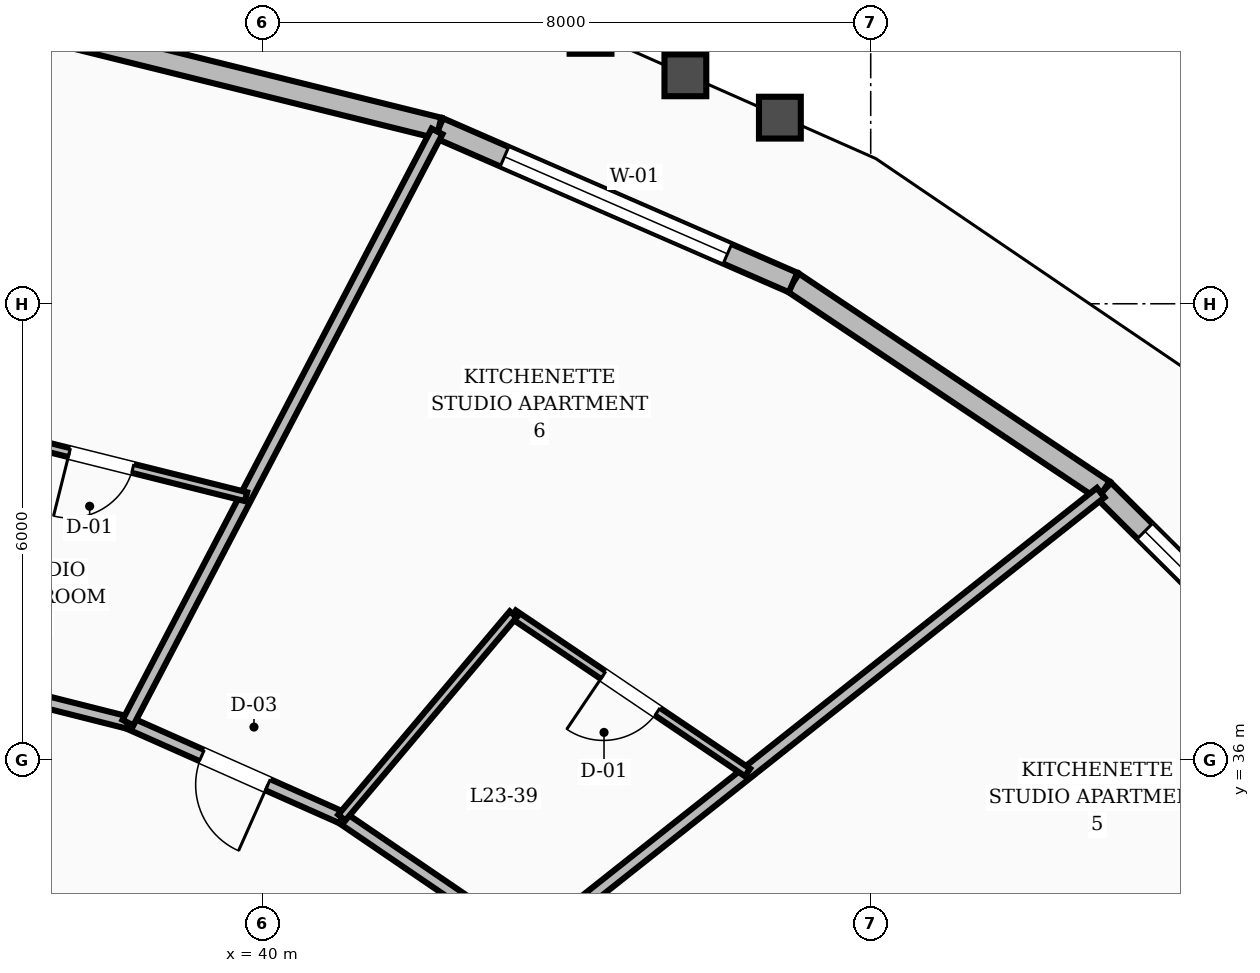
"""IFC4 building model, lengths in metres.
Left out: names, types, materials, properties, quantities, classifications, styles, units other than length and angle.
Written with IfcOpenShell. Run it as: python <this file> out.ifc"""

import sys

from ifc_helpers import new_model, si_unit, direction, frame, frame_2d, origin, place, context, subcontext, project, spatial, rectangle, extrude, element, fill, save


model = new_model("IFC4")
c1 = context("Model", 3, precision=1e-05, world=origin(), true_north=direction((0.0, 1.0)))
c2 = subcontext(c1, "Body", "Model", "MODEL_VIEW")
j1 = project(units=[si_unit("LENGTHUNIT", "METRE"), si_unit("PLANEANGLEUNIT", "RADIAN")], contexts=[c1])
p1 = place(None, origin())
s1 = spatial("IfcSite", under=j1, at=p1, CompositionType="ELEMENT")
p2 = place(p1, origin())
s2 = spatial("IfcBuilding", under=s1, at=p2, CompositionType="ELEMENT")
p3 = place(p2, frame((0.0, 0.0, 91.6)))
s3 = spatial("IfcBuildingStorey", under=s2, at=p3, CompositionType="ELEMENT", Elevation=91.6)
p4 = place(p3, frame((54.418, 36.214, 0.0), z_axis=(0.0, 0.0, 1.0), x_axis=(-0.709375776042, 0.704830482006, 0.0)))
e1 = element("IfcWall", 1, at=p4, inside=s3, PredefinedType="STANDARD", context=c2, shape_type="SweptSolid", body=[
    extrude(rectangle(XDim=4.727, YDim=0.28, at=frame_2d((2.363, 0.0))), origin(), (0.0, 0.0, 1.0), 2.71),
])
p5 = place(p4, frame((0.763, 0.0, 0.8)))
e2 = element("IfcOpeningElement", 2, at=p5, cuts=e1, PredefinedType="OPENING", context=c2, shape_type="SweptSolid", body=[
    extrude(rectangle(XDim=3.2, YDim=1.65, at=frame_2d((1.6, 0.825))), frame((0.0, 0.15, 0.0), z_axis=(0.0, -1.0, 0.0), x_axis=(1.0, 0.0, 0.0)), (0.0, 0.0, 1.0), 0.3),
])
p6 = place(p3, frame((51.065, 39.546, 0.0), z_axis=(0.0, 0.0, 1.0), x_axis=(-0.831078719633, 0.556154800189, 0.0)))
e3 = element("IfcWall", 3, at=p6, inside=s3, PredefinedType="STANDARD", context=c2, shape_type="SweptSolid", body=[
    extrude(rectangle(XDim=4.916, YDim=0.28, at=frame_2d((2.458, 0.0))), origin(), (0.0, 0.0, 1.0), 2.71),
])
p7 = place(p3, frame((46.979, 42.28, 0.0), z_axis=(0.0, 0.0, 1.0), x_axis=(-0.916706336202, 0.399561626244, 0.0)))
e4 = element("IfcWall", 4, at=p7, inside=s3, PredefinedType="STANDARD", context=c2, shape_type="SweptSolid", body=[
    extrude(rectangle(XDim=5.085, YDim=0.28, at=frame_2d((2.542, 0.0))), origin(), (0.0, 0.0, 1.0), 2.71),
])
p8 = place(p7, frame((0.942, 0.0, 0.8)))
e5 = element("IfcOpeningElement", 5, at=p8, cuts=e4, PredefinedType="OPENING", context=c2, shape_type="SweptSolid", body=[
    extrude(rectangle(XDim=3.2, YDim=1.65, at=frame_2d((1.6, 0.825))), frame((0.0, 0.15, 0.0), z_axis=(0.0, -1.0, 0.0), x_axis=(1.0, 0.0, 0.0)), (0.0, 0.0, 1.0), 0.3),
])
p9 = place(p3, frame((42.318, 44.312, 0.0), z_axis=(0.0, 0.0, 1.0), x_axis=(-0.970745887498, 0.240109187466, 0.0)))
e6 = element("IfcWall", 6, at=p9, inside=s3, PredefinedType="STANDARD", context=c2, shape_type="SweptSolid", body=[
    extrude(rectangle(XDim=5.21, YDim=0.28, at=frame_2d((2.605, 0.0))), origin(), (0.0, 0.0, 1.0), 2.71),
])
p10 = place(p3, frame((43.508, 33.559, 0.0), z_axis=(0.0, 0.0, 1.0), x_axis=(-0.826293096206, 0.56324037423, 0.0)))
e7 = element("IfcWall", 7, at=p10, inside=s3, PredefinedType="SOLIDWALL", context=c2, shape_type="SweptSolid", body=[
    extrude(rectangle(XDim=2.985, YDim=0.16, at=frame_2d((1.492, 0.0))), origin(), (0.0, 0.0, 1.0), 2.71),
])
p11 = place(p3, frame((41.041, 35.24, 0.0), z_axis=(0.0, 0.0, 1.0), x_axis=(-0.913952123493, 0.405822024984, 0.0)))
e8 = element("IfcWall", 8, at=p11, inside=s3, PredefinedType="SOLIDWALL", context=c2, shape_type="SweptSolid", body=[
    extrude(rectangle(XDim=3.078, YDim=0.16, at=frame_2d((1.539, 0.0))), origin(), (0.0, 0.0, 1.0), 2.71),
])
p12 = place(p11, frame((1.064, 0.0, 0.0)))
e9 = element("IfcOpeningElement", 9, at=p12, cuts=e8, PredefinedType="OPENING", context=c2, shape_type="SweptSolid", body=[
    extrude(rectangle(XDim=0.95, YDim=2.1, at=frame_2d((0.475, 1.05))), frame((0.0, 0.09, 0.0), z_axis=(0.0, -1.0, 0.0), x_axis=(1.0, 0.0, 0.0)), (0.0, 0.0, 1.0), 0.18),
])
p13 = place(p3, frame((38.228, 36.489, 0.0), z_axis=(0.0, 0.0, 1.0), x_axis=(-0.969689238064, 0.244341526521, 0.0)))
e10 = element("IfcWall", 10, at=p13, inside=s3, PredefinedType="SOLIDWALL", context=c2, shape_type="SweptSolid", body=[
    extrude(rectangle(XDim=3.148, YDim=0.16, at=frame_2d((1.574, 0.0))), origin(), (0.0, 0.0, 1.0), 2.71),
])
p14 = place(p3, frame((43.508, 33.559, 0.0), z_axis=(0.0, 0.0, 1.0), x_axis=(0.783820213827, 0.620987819846, 0.0)))
e11 = element("IfcWall", 11, at=p14, inside=s3, PredefinedType="SOLIDWALL", context=c2, shape_type="SweptSolid", body=[
    extrude(rectangle(XDim=9.591, YDim=0.16, at=frame_2d((4.796, 0.0))), origin(), (0.0, 0.0, 1.0), 2.71),
])
p15 = place(p3, frame((46.379, 35.834, 0.0), z_axis=(0.0, 0.0, 1.0), x_axis=(-0.828691848629, 0.559705118805, 0.0)))
e12 = element("IfcWall", 12, at=p15, inside=s3, PredefinedType="PARTITIONING", context=c2, shape_type="SweptSolid", body=[
    extrude(rectangle(XDim=3.719, YDim=0.12, at=frame_2d((1.859, 0.0))), origin(), (0.0, 0.0, 1.0), 2.71),
])
p16 = place(p15, frame((1.429, 0.0, 0.0)))
e13 = element("IfcOpeningElement", 13, at=p16, cuts=e12, PredefinedType="OPENING", context=c2, shape_type="SweptSolid", body=[
    extrude(rectangle(XDim=0.86, YDim=2.1, at=frame_2d((0.43, 1.05))), frame((0.0, 0.07, 0.0), z_axis=(0.0, -1.0, 0.0), x_axis=(1.0, 0.0, 0.0)), (0.0, 0.0, 1.0), 0.14),
])
p17 = place(p3, frame((41.041, 35.24, 0.0), z_axis=(0.0, 0.0, 1.0), x_axis=(0.644715569152, 0.764422549964, 0.0)))
e14 = element("IfcWall", 14, at=p17, inside=s3, PredefinedType="PARTITIONING", context=c2, shape_type="SweptSolid", body=[
    extrude(rectangle(XDim=3.5, YDim=0.12, at=frame_2d((1.75, 0.0))), origin(), (0.0, 0.0, 1.0), 2.71),
])
p18 = place(p3, frame((38.228, 36.489, 0.0), z_axis=(0.0, 0.0, 1.0), x_axis=(0.463329180803, 0.886186250297, 0.0)))
e15 = element("IfcWall", 15, at=p18, inside=s3, PredefinedType="SOLIDWALL", context=c2, shape_type="SweptSolid", body=[
    extrude(rectangle(XDim=8.777, YDim=0.16, at=frame_2d((4.389, 0.0))), origin(), (0.0, 0.0, 1.0), 2.71),
])
p19 = place(p3, frame((39.782, 39.462, 0.0), z_axis=(0.0, 0.0, 1.0), x_axis=(-0.970233747501, 0.242170343376, 0.0)))
e16 = element("IfcWall", 16, at=p19, inside=s3, PredefinedType="PARTITIONING", context=c2, shape_type="SweptSolid", body=[
    extrude(rectangle(XDim=3.932, YDim=0.12, at=frame_2d((1.966, 0.0))), origin(), (0.0, 0.0, 1.0), 2.71),
])
p20 = place(p19, frame((1.536, 0.0, 0.0)))
e17 = element("IfcOpeningElement", 17, at=p20, cuts=e16, PredefinedType="OPENING", context=c2, shape_type="SweptSolid", body=[
    extrude(rectangle(XDim=0.86, YDim=2.1, at=frame_2d((0.43, 1.05))), frame((0.0, 0.07, 0.0), z_axis=(0.0, -1.0, 0.0), x_axis=(1.0, 0.0, 0.0)), (0.0, 0.0, 1.0), 0.14),
])
p21 = place(p5, origin())
e18 = element("IfcWindow", 18, at=p21, inside=s3, PartitioningType="SINGLE_PANEL", PredefinedType="WINDOW", context=c2, shape_type="SweptSolid", body=[
    extrude(rectangle(XDim=3.2, YDim=1.65, at=frame_2d((1.6, 0.825))), frame((0.0, 0.03, 0.0), z_axis=(0.0, -1.0, 0.0), x_axis=(1.0, 0.0, 0.0)), (0.0, 0.0, 1.0), 0.06),
])
fill(e2, e18)
p22 = place(p8, origin())
e19 = element("IfcWindow", 19, at=p22, inside=s3, PartitioningType="SINGLE_PANEL", PredefinedType="WINDOW", context=c2, shape_type="SweptSolid", body=[
    extrude(rectangle(XDim=3.2, YDim=1.65, at=frame_2d((1.6, 0.825))), frame((0.0, 0.03, 0.0), z_axis=(0.0, -1.0, 0.0), x_axis=(1.0, 0.0, 0.0)), (0.0, 0.0, 1.0), 0.06),
])
fill(e5, e19)
p23 = place(p16, origin())
e20 = element("IfcDoor", 20, at=p23, inside=s3, OperationType="SINGLE_SWING_RIGHT", PredefinedType="DOOR", context=c2, shape_type="SweptSolid", body=[
    extrude(rectangle(XDim=0.86, YDim=2.1, at=frame_2d((0.43, 1.05))), frame((0.0, 0.025, 0.0), z_axis=(0.0, -1.0, 0.0), x_axis=(1.0, 0.0, 0.0)), (0.0, 0.0, 1.0), 0.05),
])
fill(e13, e20)
p24 = place(p12, origin())
e21 = element("IfcDoor", 21, at=p24, inside=s3, OperationType="SINGLE_SWING_LEFT", PredefinedType="DOOR", context=c2, shape_type="SweptSolid", body=[
    extrude(rectangle(XDim=0.95, YDim=2.1, at=frame_2d((0.475, 1.05))), frame((0.0, 0.025, 0.0), z_axis=(0.0, -1.0, 0.0), x_axis=(1.0, 0.0, 0.0)), (0.0, 0.0, 1.0), 0.05),
])
fill(e9, e21)
p25 = place(p20, origin())
e22 = element("IfcDoor", 22, at=p25, inside=s3, OperationType="SINGLE_SWING_RIGHT", PredefinedType="DOOR", context=c2, shape_type="SweptSolid", body=[
    extrude(rectangle(XDim=0.86, YDim=2.1, at=frame_2d((0.43, 1.05))), frame((0.0, 0.025, 0.0), z_axis=(0.0, -1.0, 0.0), x_axis=(1.0, 0.0, 0.0)), (0.0, 0.0, 1.0), 0.05),
])
fill(e17, e22)
save(model, sys.argv[1])
